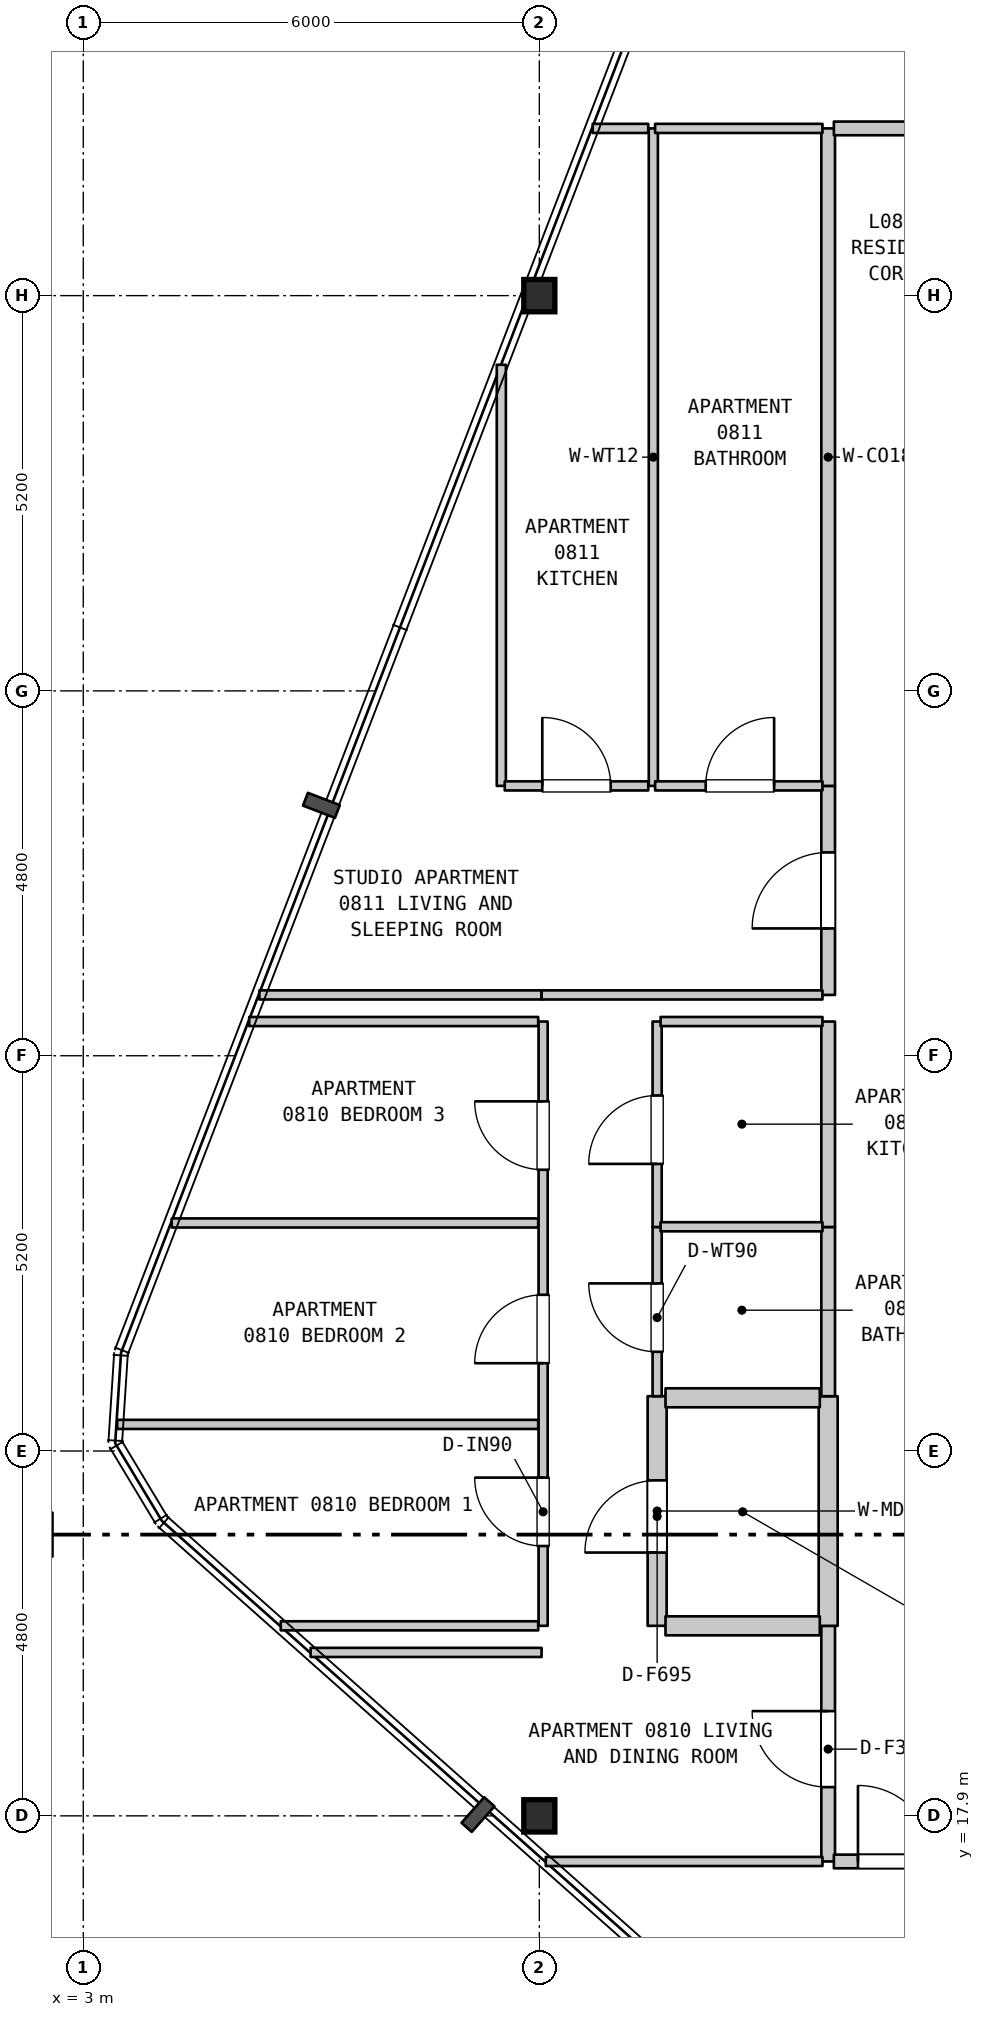
"""IFC4 building model, lengths in metres.
Left out: names, types, materials, properties, quantities, classifications, styles, units other than length and angle.
Written with IfcOpenShell. Run it as: python <this file> out.ifc"""

import sys

from ifc_helpers import new_model, si_unit, direction, frame, frame_2d, origin, origin_2d, place, context, subcontext, project, spatial, rectangle, i_section, extrude, element, fill, save


model = new_model("IFC4")
c1 = context("Model", 3, precision=1e-05, world=origin(), true_north=direction((0.0, 1.0)))
c2 = subcontext(c1, "Body", "Model", "MODEL_VIEW")
j1 = project(units=[si_unit("LENGTHUNIT", "METRE"), si_unit("PLANEANGLEUNIT", "RADIAN")], contexts=[c1])
p1 = place(None, origin())
s1 = spatial("IfcSite", under=j1, at=p1, CompositionType="ELEMENT")
p2 = place(p1, origin())
s2 = spatial("IfcBuilding", under=s1, at=p2, CompositionType="ELEMENT")
p3 = place(p2, frame((0.0, 0.0, 38.8)))
s3 = spatial("IfcBuildingStorey", under=s2, at=p3, CompositionType="ELEMENT", Elevation=38.8)
for number, where, z_axis, x_axis in (
    (1, (9.0, 17.9, 0.0), (0.0, 0.0, 1.0), (1.0, 0.0, 0.0)),
    (2, (9.0, 37.9, 0.0), (0.0, 0.0, 1.0), (1.0, 0.0, 0.0)),
):
    element("IfcColumn", number, at=place(p3, frame(where, z_axis=z_axis, x_axis=x_axis)), inside=s3, PredefinedType="COLUMN", context=c2, shape_type="SweptSolid", body=[
        extrude(i_section(OverallWidth=0.409, OverallDepth=0.425, WebThickness=0.032, FlangeThickness=0.052, FilletRadius=0.015, at=origin_2d()), origin(), (0.0, 0.0, 1.0), 3.7),
    ])
p4 = place(p3, frame((8.5, 31.45, 0.0), z_axis=(0.0, 0.0, 1.0), x_axis=(0.0, 1.0, 0.0)))
e3 = element("IfcWall", 3, at=p4, inside=s3, PredefinedType="PARTITIONING", context=c2, shape_type="SweptSolid", body=[
    extrude(rectangle(XDim=5.54, YDim=0.12, at=frame_2d((2.77, 0.0))), origin(), (0.0, 0.0, 1.0), 3.385),
])
p5 = place(p3, frame((9.05, 20.4, 0.0), z_axis=(0.0, 0.0, 1.0), x_axis=(0.0, 1.0, 0.0)))
e4 = element("IfcWall", 4, at=p5, inside=s3, PredefinedType="PARTITIONING", context=c2, shape_type="SweptSolid", body=[
    extrude(rectangle(XDim=7.95, YDim=0.12, at=frame_2d((3.975, 0.0))), origin(), (0.0, 0.0, 1.0), 2.785),
])
p6 = place(p5, frame((1.05, 0.0, 0.0)))
e5 = element("IfcOpeningElement", 5, at=p6, cuts=e4, PredefinedType="OPENING", context=c2, shape_type="SweptSolid", body=[
    extrude(rectangle(XDim=0.9, YDim=2.15, at=frame_2d((0.45, 1.075))), frame((0.0, 0.07, 0.0), z_axis=(0.0, -1.0, 0.0), x_axis=(1.0, 0.0, 0.0)), (0.0, 0.0, 1.0), 0.14),
])
p7 = place(p5, frame((3.455, 0.0, 0.0)))
e6 = element("IfcOpeningElement", 6, at=p7, cuts=e4, PredefinedType="OPENING", context=c2, shape_type="SweptSolid", body=[
    extrude(rectangle(XDim=0.9, YDim=2.15, at=frame_2d((0.45, 1.075))), frame((0.0, 0.07, 0.0), z_axis=(0.0, -1.0, 0.0), x_axis=(1.0, 0.0, 0.0)), (0.0, 0.0, 1.0), 0.14),
])
p8 = place(p5, frame((6.0, 0.0, 0.0)))
e7 = element("IfcOpeningElement", 7, at=p8, cuts=e4, PredefinedType="OPENING", context=c2, shape_type="SweptSolid", body=[
    extrude(rectangle(XDim=0.9, YDim=2.15, at=frame_2d((0.45, 1.075))), frame((0.0, 0.07, 0.0), z_axis=(0.0, -1.0, 0.0), x_axis=(1.0, 0.0, 0.0)), (0.0, 0.0, 1.0), 0.14),
])
p9 = place(p3, frame((10.5, 31.45, 0.0), z_axis=(0.0, 0.0, 1.0), x_axis=(0.0, 1.0, 0.0)))
e8 = element("IfcWall", 8, at=p9, inside=s3, PredefinedType="PARTITIONING", context=c2, shape_type="SweptSolid", body=[
    extrude(rectangle(XDim=8.65, YDim=0.12, at=frame_2d((4.325, 0.0))), origin(), (0.0, 0.0, 1.0), 3.385),
])
p10 = place(p3, frame((10.55, 20.4, 0.0), z_axis=(0.0, 0.0, 1.0), x_axis=(0.0, 1.0, 0.0)))
e9 = element("IfcWall", 9, at=p10, inside=s3, PredefinedType="STANDARD", context=c2, shape_type="SweptSolid", body=[
    extrude(rectangle(XDim=3.021, YDim=0.25, at=frame_2d((1.51, 0.0))), origin(), (0.0, 0.0, 1.0), 3.385),
])
p11 = place(p10, frame((0.964, 0.0, 0.0)))
e10 = element("IfcOpeningElement", 10, at=p11, cuts=e9, PredefinedType="OPENING", context=c2, shape_type="SweptSolid", body=[
    extrude(rectangle(XDim=0.95, YDim=2.15, at=frame_2d((0.475, 1.075))), frame((0.0, 0.135, 0.0), z_axis=(0.0, -1.0, 0.0), x_axis=(1.0, 0.0, 0.0)), (0.0, 0.0, 1.0), 0.27),
])
p12 = place(p3, frame((10.55, 23.421, 0.0), z_axis=(0.0, 0.0, 1.0), x_axis=(0.0, 1.0, 0.0)))
e11 = element("IfcWall", 11, at=p12, inside=s3, PredefinedType="PARTITIONING", context=c2, shape_type="SweptSolid", body=[
    extrude(rectangle(XDim=2.226, YDim=0.12, at=frame_2d((1.113, 0.0))), origin(), (0.0, 0.0, 1.0), 3.385),
])
p13 = place(p12, frame((0.584, 0.0, 0.0)))
e12 = element("IfcOpeningElement", 12, at=p13, cuts=e11, PredefinedType="OPENING", context=c2, shape_type="SweptSolid", body=[
    extrude(rectangle(XDim=0.9, YDim=2.1, at=frame_2d((0.45, 1.05))), frame((0.0, 0.07, 0.0), z_axis=(0.0, -1.0, 0.0), x_axis=(1.0, 0.0, 0.0)), (0.0, 0.0, 1.0), 0.14),
])
p14 = place(p3, frame((10.55, 25.647, 0.0), z_axis=(0.0, 0.0, 1.0), x_axis=(0.0, 1.0, 0.0)))
e13 = element("IfcWall", 13, at=p14, inside=s3, PredefinedType="PARTITIONING", context=c2, shape_type="SweptSolid", body=[
    extrude(rectangle(XDim=2.703, YDim=0.12, at=frame_2d((1.352, 0.0))), origin(), (0.0, 0.0, 1.0), 3.385),
])
p15 = place(p14, frame((0.83, 0.0, 0.0)))
e14 = element("IfcOpeningElement", 14, at=p15, cuts=e13, PredefinedType="OPENING", context=c2, shape_type="SweptSolid", body=[
    extrude(rectangle(XDim=0.9, YDim=2.15, at=frame_2d((0.45, 1.075))), frame((0.0, 0.07, 0.0), z_axis=(0.0, -1.0, 0.0), x_axis=(1.0, 0.0, 0.0)), (0.0, 0.0, 1.0), 0.14),
])
p16 = place(p3, frame((12.8, 17.3, 0.0), z_axis=(0.0, 0.0, 1.0), x_axis=(0.0, 1.0, 0.0)))
e15 = element("IfcWall", 15, at=p16, inside=s3, PredefinedType="STANDARD", context=c2, shape_type="SweptSolid", body=[
    extrude(rectangle(XDim=3.1, YDim=0.18, at=frame_2d((1.55, 0.0))), origin(), (0.0, 0.0, 1.0), 3.385),
])
p17 = place(p16, frame((0.978, 0.0, 0.0)))
e16 = element("IfcOpeningElement", 16, at=p17, cuts=e15, PredefinedType="OPENING", context=c2, shape_type="SweptSolid", body=[
    extrude(rectangle(XDim=1.0, YDim=2.15, at=frame_2d((0.5, 1.075))), frame((0.0, 0.1, 0.0), z_axis=(0.0, -1.0, 0.0), x_axis=(1.0, 0.0, 0.0)), (0.0, 0.0, 1.0), 0.2),
])
p18 = place(p3, frame((12.8, 20.4, 0.0), z_axis=(0.0, 0.0, 1.0), x_axis=(0.0, 1.0, 0.0)))
e17 = element("IfcWall", 17, at=p18, inside=s3, PredefinedType="STANDARD", context=c2, shape_type="SweptSolid", body=[
    extrude(rectangle(XDim=3.021, YDim=0.25, at=frame_2d((1.51, 0.0))), origin(), (0.0, 0.0, 1.0), 3.385),
])
p19 = place(p3, frame((12.8, 23.421, 0.0), z_axis=(0.0, 0.0, 1.0), x_axis=(0.0, 1.0, 0.0)))
e18 = element("IfcWall", 18, at=p19, inside=s3, PredefinedType="STANDARD", context=c2, shape_type="SweptSolid", body=[
    extrude(rectangle(XDim=2.226, YDim=0.18, at=frame_2d((1.113, 0.0))), origin(), (0.0, 0.0, 1.0), 3.385),
])
p20 = place(p3, frame((12.8, 25.647, 0.0), z_axis=(0.0, 0.0, 1.0), x_axis=(0.0, 1.0, 0.0)))
e19 = element("IfcWall", 19, at=p20, inside=s3, PredefinedType="STANDARD", context=c2, shape_type="SweptSolid", body=[
    extrude(rectangle(XDim=2.703, YDim=0.18, at=frame_2d((1.352, 0.0))), origin(), (0.0, 0.0, 1.0), 3.385),
])
p21 = place(p3, frame((12.8, 28.7, 0.0), z_axis=(0.0, 0.0, 1.0), x_axis=(0.0, 1.0, 0.0)))
e20 = element("IfcWall", 20, at=p21, inside=s3, PredefinedType="STANDARD", context=c2, shape_type="SweptSolid", body=[
    extrude(rectangle(XDim=2.75, YDim=0.18, at=frame_2d((1.375, 0.0))), origin(), (0.0, 0.0, 1.0), 3.385),
])
p22 = place(p21, frame((0.875, 0.0, 0.0)))
e21 = element("IfcOpeningElement", 21, at=p22, cuts=e20, PredefinedType="OPENING", context=c2, shape_type="SweptSolid", body=[
    extrude(rectangle(XDim=1.0, YDim=2.15, at=frame_2d((0.5, 1.075))), frame((0.0, 0.1, 0.0), z_axis=(0.0, -1.0, 0.0), x_axis=(1.0, 0.0, 0.0)), (0.0, 0.0, 1.0), 0.2),
])
p23 = place(p3, frame((12.8, 31.45, 0.0), z_axis=(0.0, 0.0, 1.0), x_axis=(0.0, 1.0, 0.0)))
e22 = element("IfcWall", 22, at=p23, inside=s3, PredefinedType="STANDARD", context=c2, shape_type="SweptSolid", body=[
    extrude(rectangle(XDim=8.65, YDim=0.18, at=frame_2d((4.325, 0.0))), origin(), (0.0, 0.0, 1.0), 3.385),
])
p24 = place(p3, frame((9.085, 17.3, 0.0), z_axis=(0.0, 0.0, 1.0), x_axis=(1.0, 0.0, 0.0)))
e23 = element("IfcWall", 23, at=p24, inside=s3, PredefinedType="PARTITIONING", context=c2, shape_type="SweptSolid", body=[
    extrude(rectangle(XDim=3.64, YDim=0.12, at=frame_2d((1.82, 0.0))), origin(), (0.0, 0.0, 1.0), 3.385),
])
p25 = place(p3, frame((12.875, 17.3, 0.0), z_axis=(0.0, 0.0, 1.0), x_axis=(1.0, 0.0, 0.0)))
e24 = element("IfcWall", 24, at=p25, inside=s3, PredefinedType="STANDARD", context=c2, shape_type="SweptSolid", body=[
    extrude(rectangle(XDim=3.78, YDim=0.18, at=frame_2d((1.89, 0.0))), origin(), (0.0, 0.0, 1.0), 3.385),
])
p26 = place(p25, frame((0.317, 0.0, 0.0)))
e25 = element("IfcOpeningElement", 25, at=p26, cuts=e24, PredefinedType="OPENING", context=c2, shape_type="SweptSolid", body=[
    extrude(rectangle(XDim=1.0, YDim=2.15, at=frame_2d((0.5, 1.075))), frame((0.0, 0.1, 0.0), z_axis=(0.0, -1.0, 0.0), x_axis=(1.0, 0.0, 0.0)), (0.0, 0.0, 1.0), 0.2),
])
p27 = place(p3, frame((5.991, 20.05, 0.0), z_axis=(0.0, 0.0, 1.0), x_axis=(1.0, 0.0, 0.0)))
e26 = element("IfcWall", 26, at=p27, inside=s3, PredefinedType="PARTITIONING", context=c2, shape_type="SweptSolid", body=[
    extrude(rectangle(XDim=3.039, YDim=0.12, at=frame_2d((1.52, 0.0))), origin(), (0.0, 0.0, 1.0), 3.385),
])
p28 = place(p3, frame((5.598, 20.4, 0.0), z_axis=(0.0, 0.0, 1.0), x_axis=(1.0, 0.0, 0.0)))
e27 = element("IfcWall", 27, at=p28, inside=s3, PredefinedType="PARTITIONING", context=c2, shape_type="SweptSolid", body=[
    extrude(rectangle(XDim=3.387, YDim=0.12, at=frame_2d((1.694, 0.0))), origin(), (0.0, 0.0, 1.0), 3.385),
])
p29 = place(p3, frame((10.66, 20.4, 0.0), z_axis=(0.0, 0.0, 1.0), x_axis=(1.0, 0.0, 0.0)))
e28 = element("IfcWall", 28, at=p29, inside=s3, PredefinedType="STANDARD", context=c2, shape_type="SweptSolid", body=[
    extrude(rectangle(XDim=2.03, YDim=0.25, at=frame_2d((1.015, 0.0))), origin(), (0.0, 0.0, 1.0), 3.385),
])
p30 = place(p3, frame((3.446, 23.05, 0.0), z_axis=(0.0, 0.0, 1.0), x_axis=(1.0, 0.0, 0.0)))
e29 = element("IfcWall", 29, at=p30, inside=s3, PredefinedType="PARTITIONING", context=c2, shape_type="SweptSolid", body=[
    extrude(rectangle(XDim=5.539, YDim=0.12, at=frame_2d((2.77, 0.0))), origin(), (0.0, 0.0, 1.0), 3.385),
])
p31 = place(p3, frame((10.66, 23.4, 0.0), z_axis=(0.0, 0.0, 1.0), x_axis=(1.0, 0.0, 0.0)))
e30 = element("IfcWall", 30, at=p31, inside=s3, PredefinedType="STANDARD", context=c2, shape_type="SweptSolid", body=[
    extrude(rectangle(XDim=2.03, YDim=0.25, at=frame_2d((1.015, 0.0))), origin(), (0.0, 0.0, 1.0), 3.385),
])
p32 = place(p3, frame((10.595, 25.65, 0.0), z_axis=(0.0, 0.0, 1.0), x_axis=(1.0, 0.0, 0.0)))
e31 = element("IfcWall", 31, at=p32, inside=s3, PredefinedType="PARTITIONING", context=c2, shape_type="SweptSolid", body=[
    extrude(rectangle(XDim=2.13, YDim=0.12, at=frame_2d((1.065, 0.0))), origin(), (0.0, 0.0, 1.0), 3.385),
])
p33 = place(p3, frame((4.164, 25.7, 0.0), z_axis=(0.0, 0.0, 1.0), x_axis=(1.0, 0.0, 0.0)))
e32 = element("IfcWall", 32, at=p33, inside=s3, PredefinedType="PARTITIONING", context=c2, shape_type="SweptSolid", body=[
    extrude(rectangle(XDim=4.821, YDim=0.12, at=frame_2d((2.411, 0.0))), origin(), (0.0, 0.0, 1.0), 3.385),
])
p34 = place(p3, frame((5.183, 28.35, 0.0), z_axis=(0.0, 0.0, 1.0), x_axis=(1.0, 0.0, 0.0)))
e33 = element("IfcWall", 33, at=p34, inside=s3, PredefinedType="PARTITIONING", context=c2, shape_type="SweptSolid", body=[
    extrude(rectangle(XDim=3.802, YDim=0.12, at=frame_2d((1.901, 0.0))), origin(), (0.0, 0.0, 1.0), 3.385),
])
p35 = place(p3, frame((10.595, 28.35, 0.0), z_axis=(0.0, 0.0, 1.0), x_axis=(1.0, 0.0, 0.0)))
e34 = element("IfcWall", 34, at=p35, inside=s3, PredefinedType="PARTITIONING", context=c2, shape_type="SweptSolid", body=[
    extrude(rectangle(XDim=2.13, YDim=0.12, at=frame_2d((1.065, 0.0))), origin(), (0.0, 0.0, 1.0), 3.385),
])
p36 = place(p3, frame((5.317, 28.7, 0.0), z_axis=(0.0, 0.0, 1.0), x_axis=(1.0, 0.0, 0.0)))
e35 = element("IfcWall", 35, at=p36, inside=s3, PredefinedType="PARTITIONING", context=c2, shape_type="SweptSolid", body=[
    extrude(rectangle(XDim=3.713, YDim=0.12, at=frame_2d((1.856, 0.0))), origin(), (0.0, 0.0, 1.0), 3.385),
])
p37 = place(p3, frame((9.03, 28.7, 0.0), z_axis=(0.0, 0.0, 1.0), x_axis=(1.0, 0.0, 0.0)))
e36 = element("IfcWall", 36, at=p37, inside=s3, PredefinedType="PARTITIONING", context=c2, shape_type="SweptSolid", body=[
    extrude(rectangle(XDim=3.695, YDim=0.12, at=frame_2d((1.848, 0.0))), origin(), (0.0, 0.0, 1.0), 3.385),
])
p38 = place(p3, frame((8.545, 31.45, 0.0), z_axis=(0.0, 0.0, 1.0), x_axis=(1.0, 0.0, 0.0)))
e37 = element("IfcWall", 37, at=p38, inside=s3, PredefinedType="PARTITIONING", context=c2, shape_type="SweptSolid", body=[
    extrude(rectangle(XDim=1.888, YDim=0.12, at=frame_2d((0.944, 0.0))), origin(), (0.0, 0.0, 1.0), 3.385),
])
p39 = place(p38, frame((0.494, 0.0, 0.0)))
e38 = element("IfcOpeningElement", 38, at=p39, cuts=e37, PredefinedType="OPENING", context=c2, shape_type="SweptSolid", body=[
    extrude(rectangle(XDim=0.9, YDim=2.15, at=frame_2d((0.45, 1.075))), frame((0.0, 0.07, 0.0), z_axis=(0.0, -1.0, 0.0), x_axis=(1.0, 0.0, 0.0)), (0.0, 0.0, 1.0), 0.14),
])
p40 = place(p3, frame((10.523, 31.45, 0.0), z_axis=(0.0, 0.0, 1.0), x_axis=(1.0, 0.0, 0.0)))
e39 = element("IfcWall", 39, at=p40, inside=s3, PredefinedType="PARTITIONING", context=c2, shape_type="SweptSolid", body=[
    extrude(rectangle(XDim=2.202, YDim=0.12, at=frame_2d((1.101, 0.0))), origin(), (0.0, 0.0, 1.0), 3.385),
])
p41 = place(p40, frame((0.666, 0.0, 0.0)))
e40 = element("IfcOpeningElement", 40, at=p41, cuts=e39, PredefinedType="OPENING", context=c2, shape_type="SweptSolid", body=[
    extrude(rectangle(XDim=0.9, YDim=2.1, at=frame_2d((0.45, 1.05))), frame((0.0, 0.07, 0.0), z_axis=(0.0, -1.0, 0.0), x_axis=(1.0, 0.0, 0.0)), (0.0, 0.0, 1.0), 0.14),
])
p42 = place(p3, frame((9.702, 40.1, 0.0), z_axis=(0.0, 0.0, 1.0), x_axis=(1.0, 0.0, 0.0)))
e41 = element("IfcWall", 41, at=p42, inside=s3, PredefinedType="PARTITIONING", context=c2, shape_type="SweptSolid", body=[
    extrude(rectangle(XDim=0.731, YDim=0.12, at=frame_2d((0.366, 0.0))), origin(), (0.0, 0.0, 1.0), 3.385),
])
p43 = place(p3, frame((10.523, 40.1, 0.0), z_axis=(0.0, 0.0, 1.0), x_axis=(1.0, 0.0, 0.0)))
e42 = element("IfcWall", 42, at=p43, inside=s3, PredefinedType="PARTITIONING", context=c2, shape_type="SweptSolid", body=[
    extrude(rectangle(XDim=2.202, YDim=0.12, at=frame_2d((1.101, 0.0))), origin(), (0.0, 0.0, 1.0), 3.385),
])
p44 = place(p3, frame((12.875, 40.1, 0.0), z_axis=(0.0, 0.0, 1.0), x_axis=(1.0, 0.0, 0.0)))
e43 = element("IfcWall", 43, at=p44, inside=s3, PredefinedType="STANDARD", context=c2, shape_type="SweptSolid", body=[
    extrude(rectangle(XDim=5.03, YDim=0.18, at=frame_2d((2.515, 0.0))), origin(), (0.0, 0.0, 1.0), 3.385),
])
p45 = place(p44, frame((2.0, 0.0, 0.0)))
e44 = element("IfcOpeningElement", 44, at=p45, cuts=e43, PredefinedType="OPENING", context=c2, shape_type="SweptSolid", body=[
    extrude(rectangle(XDim=1.0, YDim=2.15, at=frame_2d((0.5, 1.075))), frame((0.0, 0.1, 0.0), z_axis=(0.0, -1.0, 0.0), x_axis=(1.0, 0.0, 0.0)), (0.0, 0.0, 1.0), 0.2),
])
p46 = place(p6, origin())
e45 = element("IfcDoor", 45, at=p46, inside=s3, OperationType="SINGLE_SWING_RIGHT", PredefinedType="DOOR", context=c2, shape_type="SweptSolid", body=[
    extrude(rectangle(XDim=0.9, YDim=2.15, at=frame_2d((0.45, 1.075))), frame((0.0, 0.025, 0.0), z_axis=(0.0, -1.0, 0.0), x_axis=(1.0, 0.0, 0.0)), (0.0, 0.0, 1.0), 0.05),
])
fill(e5, e45)
p47 = place(p7, origin())
e46 = element("IfcDoor", 46, at=p47, inside=s3, OperationType="SINGLE_SWING_LEFT", PredefinedType="DOOR", context=c2, shape_type="SweptSolid", body=[
    extrude(rectangle(XDim=0.9, YDim=2.15, at=frame_2d((0.45, 1.075))), frame((0.0, 0.025, 0.0), z_axis=(0.0, -1.0, 0.0), x_axis=(1.0, 0.0, 0.0)), (0.0, 0.0, 1.0), 0.05),
])
fill(e6, e46)
p48 = place(p8, origin())
e47 = element("IfcDoor", 47, at=p48, inside=s3, OperationType="SINGLE_SWING_RIGHT", PredefinedType="DOOR", context=c2, shape_type="SweptSolid", body=[
    extrude(rectangle(XDim=0.9, YDim=2.15, at=frame_2d((0.45, 1.075))), frame((0.0, 0.025, 0.0), z_axis=(0.0, -1.0, 0.0), x_axis=(1.0, 0.0, 0.0)), (0.0, 0.0, 1.0), 0.05),
])
fill(e7, e47)
p49 = place(p11, origin())
e48 = element("IfcDoor", 48, at=p49, inside=s3, OperationType="SINGLE_SWING_LEFT", PredefinedType="DOOR", context=c2, shape_type="SweptSolid", body=[
    extrude(rectangle(XDim=0.95, YDim=2.15, at=frame_2d((0.475, 1.075))), frame((0.0, 0.025, 0.0), z_axis=(0.0, -1.0, 0.0), x_axis=(1.0, 0.0, 0.0)), (0.0, 0.0, 1.0), 0.05),
])
fill(e10, e48)
p50 = place(p13, origin())
e49 = element("IfcDoor", 49, at=p50, inside=s3, OperationType="SINGLE_SWING_RIGHT", PredefinedType="DOOR", context=c2, shape_type="SweptSolid", body=[
    extrude(rectangle(XDim=0.9, YDim=2.1, at=frame_2d((0.45, 1.05))), frame((0.0, 0.025, 0.0), z_axis=(0.0, -1.0, 0.0), x_axis=(1.0, 0.0, 0.0)), (0.0, 0.0, 1.0), 0.05),
])
fill(e12, e49)
p51 = place(p15, origin())
e50 = element("IfcDoor", 50, at=p51, inside=s3, OperationType="SINGLE_SWING_LEFT", PredefinedType="DOOR", context=c2, shape_type="SweptSolid", body=[
    extrude(rectangle(XDim=0.9, YDim=2.15, at=frame_2d((0.45, 1.075))), frame((0.0, 0.025, 0.0), z_axis=(0.0, -1.0, 0.0), x_axis=(1.0, 0.0, 0.0)), (0.0, 0.0, 1.0), 0.05),
])
fill(e14, e50)
p52 = place(p17, origin())
e51 = element("IfcDoor", 51, at=p52, inside=s3, OperationType="SINGLE_SWING_RIGHT", PredefinedType="DOOR", context=c2, shape_type="SweptSolid", body=[
    extrude(rectangle(XDim=1.0, YDim=2.15, at=frame_2d((0.5, 1.075))), frame((0.0, 0.025, 0.0), z_axis=(0.0, -1.0, 0.0), x_axis=(1.0, 0.0, 0.0)), (0.0, 0.0, 1.0), 0.05),
])
fill(e16, e51)
p53 = place(p22, origin())
e52 = element("IfcDoor", 52, at=p53, inside=s3, OperationType="SINGLE_SWING_LEFT", PredefinedType="DOOR", context=c2, shape_type="SweptSolid", body=[
    extrude(rectangle(XDim=1.0, YDim=2.15, at=frame_2d((0.5, 1.075))), frame((0.0, 0.025, 0.0), z_axis=(0.0, -1.0, 0.0), x_axis=(1.0, 0.0, 0.0)), (0.0, 0.0, 1.0), 0.05),
])
fill(e21, e52)
p54 = place(p26, origin())
e53 = element("IfcDoor", 53, at=p54, inside=s3, OperationType="SINGLE_SWING_LEFT", PredefinedType="DOOR", context=c2, shape_type="SweptSolid", body=[
    extrude(rectangle(XDim=1.0, YDim=2.15, at=frame_2d((0.5, 1.075))), frame((0.0, 0.025, 0.0), z_axis=(0.0, -1.0, 0.0), x_axis=(1.0, 0.0, 0.0)), (0.0, 0.0, 1.0), 0.05),
])
fill(e25, e53)
p55 = place(p39, origin())
e54 = element("IfcDoor", 54, at=p55, inside=s3, OperationType="SINGLE_SWING_LEFT", PredefinedType="DOOR", context=c2, shape_type="SweptSolid", body=[
    extrude(rectangle(XDim=0.9, YDim=2.15, at=frame_2d((0.45, 1.075))), frame((0.0, 0.025, 0.0), z_axis=(0.0, -1.0, 0.0), x_axis=(1.0, 0.0, 0.0)), (0.0, 0.0, 1.0), 0.05),
])
fill(e38, e54)
p56 = place(p41, origin())
e55 = element("IfcDoor", 55, at=p56, inside=s3, OperationType="SINGLE_SWING_RIGHT", PredefinedType="DOOR", context=c2, shape_type="SweptSolid", body=[
    extrude(rectangle(XDim=0.9, YDim=2.1, at=frame_2d((0.45, 1.05))), frame((0.0, 0.025, 0.0), z_axis=(0.0, -1.0, 0.0), x_axis=(1.0, 0.0, 0.0)), (0.0, 0.0, 1.0), 0.05),
])
fill(e40, e55)
save(model, sys.argv[1])
